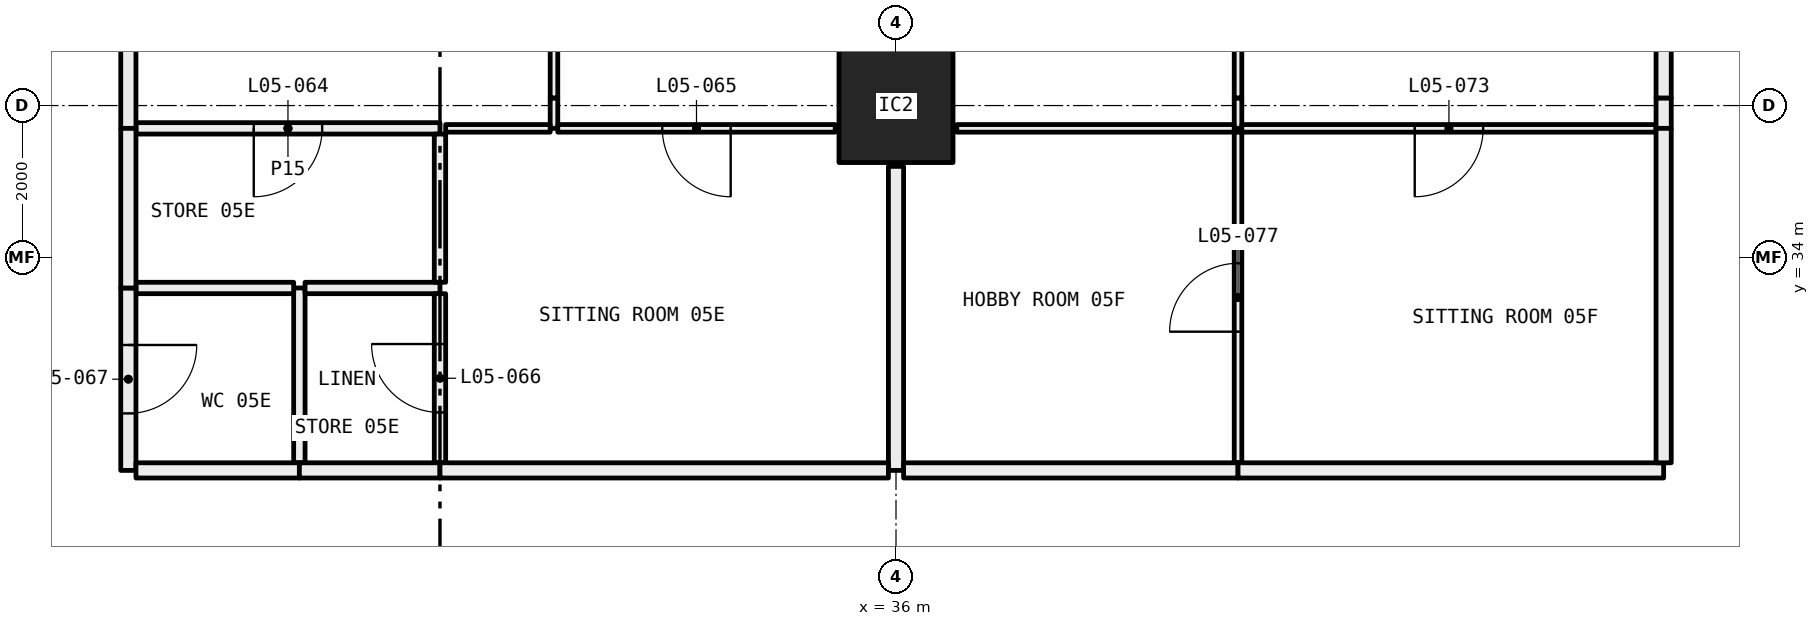
"""IFC4 building model, lengths in metres.
Left out: names, types, materials, properties, quantities, classifications, styles, units other than length and angle.
Written with IfcOpenShell. Run it as: python <this file> out.ifc"""

import sys

from ifc_helpers import new_model, si_unit, direction, frame, frame_2d, origin, origin_2d, place, context, subcontext, project, spatial, rectangle, hollow_rectangle, extrude, element, fill, save


model = new_model("IFC4")
c1 = context("Model", 3, precision=1e-05, world=origin(), true_north=direction((0.0, 1.0)))
c2 = subcontext(c1, "Body", "Model", "MODEL_VIEW")
j1 = project(units=[si_unit("LENGTHUNIT", "METRE"), si_unit("PLANEANGLEUNIT", "RADIAN")], contexts=[c1])
p1 = place(None, origin())
s1 = spatial("IfcSite", under=j1, at=p1, CompositionType="ELEMENT")
p2 = place(p1, origin())
s2 = spatial("IfcBuilding", under=s1, at=p2, CompositionType="ELEMENT")
p3 = place(p2, frame((0.0, 0.0, 30.0)))
s3 = spatial("IfcBuildingStorey", under=s2, at=p3, CompositionType="ELEMENT", Elevation=30.0)
p4 = place(p3, frame((36.0, 36.0, 0.0), z_axis=(0.0, 0.0, 1.0), x_axis=(1.0, 0.0, 0.0)))
e1 = element("IfcColumn", 1, at=p4, inside=s3, PredefinedType="COLUMN", context=c2, shape_type="SweptSolid", body=[
    extrude(hollow_rectangle(XDim=1.5, YDim=1.5, WallThickness=0.065, at=origin_2d()), origin(), (0.0, 0.0, 1.0), 3.05),
])
p5 = place(p3, frame((31.5, 35.7, 0.0), z_axis=(0.0, 0.0, 1.0), x_axis=(0.0, 1.0, 0.0)))
e2 = element("IfcWall", 2, at=p5, inside=s3, PredefinedType="PARTITIONING", context=c2, shape_type="SweptSolid", body=[
    extrude(rectangle(XDim=0.4, YDim=0.1, at=frame_2d((0.2, 0.0))), origin(), (0.0, 0.0, 1.0), 2.45),
])
p6 = place(p3, frame((31.5, 36.1, 0.0), z_axis=(0.0, 0.0, 1.0), x_axis=(0.0, 1.0, 0.0)))
e3 = element("IfcWall", 3, at=p6, inside=s3, PredefinedType="PARTITIONING", context=c2, shape_type="SweptSolid", body=[
    extrude(rectangle(XDim=5.825, YDim=0.1, at=frame_2d((2.913, 0.0))), origin(), (0.0, 0.0, 1.0), 3.05),
])
p7 = place(p6, frame((2.462, 0.0, 0.0)))
e4 = element("IfcOpeningElement", 4, at=p7, cuts=e3, PredefinedType="OPENING", context=c2, shape_type="SweptSolid", body=[
    extrude(rectangle(XDim=0.9, YDim=2.1, at=frame_2d((0.45, 1.05))), frame((0.0, 0.06, 0.0), z_axis=(0.0, -1.0, 0.0), x_axis=(1.0, 0.0, 0.0)), (0.0, 0.0, 1.0), 0.12),
])
p8 = place(p3, frame((26.0, 35.7, 0.0), z_axis=(0.0, 0.0, 1.0), x_axis=(1.0, 0.0, 0.0)))
e5 = element("IfcWall", 5, at=p8, inside=s3, PredefinedType="PARTITIONING", context=c2, shape_type="SweptSolid", body=[
    extrude(rectangle(XDim=4.0, YDim=0.15, at=frame_2d((2.0, 0.0))), origin(), (0.0, 0.0, 1.0), 3.05),
])
p9 = place(p8, frame((1.55, 0.0, 0.0)))
e6 = element("IfcOpeningElement", 6, at=p9, cuts=e5, PredefinedType="OPENING", context=c2, shape_type="SweptSolid", body=[
    extrude(rectangle(XDim=0.9, YDim=2.1, at=frame_2d((0.45, 1.05))), frame((0.0, 0.085, 0.0), z_axis=(0.0, -1.0, 0.0), x_axis=(1.0, 0.0, 0.0)), (0.0, 0.0, 1.0), 0.17),
])
p10 = place(p3, frame((30.075, 35.7, 0.0), z_axis=(0.0, 0.0, 1.0), x_axis=(1.0, 0.0, 0.0)))
e7 = element("IfcWall", 7, at=p10, inside=s3, PredefinedType="PARTITIONING", context=c2, shape_type="SweptSolid", body=[
    extrude(rectangle(XDim=1.375, YDim=0.1, at=frame_2d((0.688, 0.0))), origin(), (0.0, 0.0, 1.0), 3.05),
])
p11 = place(p3, frame((25.9, 41.9, 0.0), z_axis=(0.0, 0.0, 1.0), x_axis=(0.0, -1.0, 0.0)))
e8 = element("IfcWall", 8, at=p11, inside=s3, PredefinedType="PARTITIONING", context=c2, shape_type="SweptSolid", body=[
    extrude(rectangle(XDim=6.2, YDim=0.2, at=frame_2d((3.1, 0.0))), origin(), (0.0, 0.0, 1.0), 2.45),
])
p12 = place(p3, frame((31.55, 35.7, 0.0), z_axis=(0.0, 0.0, 1.0), x_axis=(1.0, 0.0, 0.0)))
e9 = element("IfcWall", 9, at=p12, inside=s3, PredefinedType="PARTITIONING", context=c2, shape_type="SweptSolid", body=[
    extrude(rectangle(XDim=3.65, YDim=0.1, at=frame_2d((1.825, 0.0))), origin(), (0.0, 0.0, 1.0), 3.05),
])
p13 = place(p12, frame((1.375, 0.0, 0.0)))
e10 = element("IfcOpeningElement", 10, at=p13, cuts=e9, PredefinedType="OPENING", context=c2, shape_type="SweptSolid", body=[
    extrude(rectangle(XDim=0.9, YDim=2.1, at=frame_2d((0.45, 1.05))), frame((0.0, 0.06, 0.0), z_axis=(0.0, -1.0, 0.0), x_axis=(1.0, 0.0, 0.0)), (0.0, 0.0, 1.0), 0.12),
])
p14 = place(p3, frame((28.15, 31.3, 0.0), z_axis=(0.0, 0.0, 1.0), x_axis=(0.0, 1.0, 0.0)))
e11 = element("IfcWall", 11, at=p14, inside=s3, PredefinedType="PARTITIONING", context=c2, shape_type="SweptSolid", body=[
    extrude(rectangle(XDim=2.3, YDim=0.15, at=frame_2d((1.15, 0.0))), origin(), (0.0, 0.0, 1.0), 3.05),
])
p15 = place(p3, frame((28.075, 33.6, 0.0), z_axis=(0.0, 0.0, 1.0), x_axis=(-1.0, 0.0, 0.0)))
e12 = element("IfcWall", 12, at=p15, inside=s3, PredefinedType="PARTITIONING", context=c2, shape_type="SweptSolid", body=[
    extrude(rectangle(XDim=2.075, YDim=0.15, at=frame_2d((1.038, 0.0))), origin(), (0.0, 0.0, 1.0), 3.05),
])
p16 = place(p3, frame((25.9, 33.6, 0.0), z_axis=(0.0, 0.0, 1.0), x_axis=(0.0, -1.0, 0.0)))
e13 = element("IfcWall", 13, at=p16, inside=s3, PredefinedType="PARTITIONING", context=c2, shape_type="SweptSolid", body=[
    extrude(rectangle(XDim=2.4, YDim=0.2, at=frame_2d((1.2, 0.0))), origin(), (0.0, 0.0, 1.0), 3.05),
])
p17 = place(p16, frame((0.75, 0.0, 0.0)))
e14 = element("IfcOpeningElement", 14, at=p17, cuts=e13, PredefinedType="OPENING", context=c2, shape_type="SweptSolid", body=[
    extrude(rectangle(XDim=0.9, YDim=2.1, at=frame_2d((0.45, 1.05))), frame((0.0, 0.11, 0.0), z_axis=(0.0, -1.0, 0.0), x_axis=(1.0, 0.0, 0.0)), (0.0, 0.0, 1.0), 0.22),
])
p18 = place(p3, frame((26.0, 31.2, 0.0), z_axis=(0.0, 0.0, 1.0), x_axis=(1.0, 0.0, 0.0)))
e15 = element("IfcWall", 15, at=p18, inside=s3, PredefinedType="PARTITIONING", context=c2, shape_type="SweptSolid", body=[
    extrude(rectangle(XDim=2.15, YDim=0.2, at=frame_2d((1.075, 0.0))), origin(), (0.0, 0.0, 1.0), 3.05),
])
p19 = place(p3, frame((30.0, 33.6, 0.0), z_axis=(0.0, 0.0, 1.0), x_axis=(-1.0, 0.0, 0.0)))
e16 = element("IfcWall", 16, at=p19, inside=s3, PredefinedType="PARTITIONING", context=c2, shape_type="SweptSolid", body=[
    extrude(rectangle(XDim=1.775, YDim=0.15, at=frame_2d((0.887, 0.0))), origin(), (0.0, 0.0, 1.0), 3.05),
])
p20 = place(p3, frame((30.0, 31.3, 0.0), z_axis=(0.0, 0.0, 1.0), x_axis=(0.0, 1.0, 0.0)))
e17 = element("IfcWall", 17, at=p20, inside=s3, PredefinedType="PARTITIONING", context=c2, shape_type="SweptSolid", body=[
    extrude(rectangle(XDim=2.225, YDim=0.15, at=frame_2d((1.112, 0.0))), origin(), (0.0, 0.0, 1.0), 3.05),
])
p21 = place(p20, frame((0.663, 0.0, 0.0)))
e18 = element("IfcOpeningElement", 18, at=p21, cuts=e17, PredefinedType="OPENING", context=c2, shape_type="SweptSolid", body=[
    extrude(rectangle(XDim=0.9, YDim=2.1, at=frame_2d((0.45, 1.05))), frame((0.0, 0.085, 0.0), z_axis=(0.0, -1.0, 0.0), x_axis=(1.0, 0.0, 0.0)), (0.0, 0.0, 1.0), 0.17),
])
p22 = place(p3, frame((28.15, 31.2, 0.0), z_axis=(0.0, 0.0, 1.0), x_axis=(1.0, 0.0, 0.0)))
e19 = element("IfcWall", 19, at=p22, inside=s3, PredefinedType="PARTITIONING", context=c2, shape_type="SweptSolid", body=[
    extrude(rectangle(XDim=1.85, YDim=0.2, at=frame_2d((0.925, 0.0))), origin(), (0.0, 0.0, 1.0), 3.05),
])
p23 = place(p3, frame((30.0, 33.675, 0.0), z_axis=(0.0, 0.0, 1.0), x_axis=(0.0, 1.0, 0.0)))
e20 = element("IfcWall", 20, at=p23, inside=s3, PredefinedType="PARTITIONING", context=c2, shape_type="SweptSolid", body=[
    extrude(rectangle(XDim=1.95, YDim=0.15, at=frame_2d((0.975, 0.0))), origin(), (0.0, 0.0, 1.0), 3.05),
])
p24 = place(p3, frame((25.9, 35.7, 0.0), z_axis=(0.0, 0.0, 1.0), x_axis=(0.0, -1.0, 0.0)))
e21 = element("IfcWall", 21, at=p24, inside=s3, PredefinedType="PARTITIONING", context=c2, shape_type="SweptSolid", body=[
    extrude(rectangle(XDim=2.1, YDim=0.2, at=frame_2d((1.05, 0.0))), origin(), (0.0, 0.0, 1.0), 3.05),
])
p25 = place(p3, frame((36.0, 31.2, 0.0), z_axis=(0.0, 0.0, 1.0), x_axis=(0.0, 1.0, 0.0)))
e22 = element("IfcWall", 22, at=p25, inside=s3, PredefinedType="PARTITIONING", context=c2, shape_type="SweptSolid", body=[
    extrude(rectangle(XDim=4.0, YDim=0.2, at=frame_2d((2.0, 0.0))), origin(), (0.0, 0.0, 1.0), 2.45),
])
p26 = place(p3, frame((30.0, 31.2, 0.0), z_axis=(0.0, 0.0, 1.0), x_axis=(1.0, 0.0, 0.0)))
e23 = element("IfcWall", 23, at=p26, inside=s3, PredefinedType="PARTITIONING", context=c2, shape_type="SweptSolid", body=[
    extrude(rectangle(XDim=5.9, YDim=0.2, at=frame_2d((2.95, 0.0))), origin(), (0.0, 0.0, 1.0), 3.05),
])
p27 = place(p3, frame((40.5, 35.7, 0.0), z_axis=(0.0, 0.0, 1.0), x_axis=(0.0, 1.0, 0.0)))
e24 = element("IfcWall", 24, at=p27, inside=s3, PredefinedType="PARTITIONING", context=c2, shape_type="SweptSolid", body=[
    extrude(rectangle(XDim=0.4, YDim=0.1, at=frame_2d((0.2, 0.0))), origin(), (0.0, 0.0, 1.0), 2.45),
])
p28 = place(p3, frame((40.5, 36.1, 0.0), z_axis=(0.0, 0.0, 1.0), x_axis=(0.0, 1.0, 0.0)))
e25 = element("IfcWall", 25, at=p28, inside=s3, PredefinedType="PARTITIONING", context=c2, shape_type="SweptSolid", body=[
    extrude(rectangle(XDim=5.825, YDim=0.1, at=frame_2d((2.913, 0.0))), origin(), (0.0, 0.0, 1.0), 3.05),
])
p29 = place(p28, frame((2.462, 0.0, 0.0)))
e26 = element("IfcOpeningElement", 26, at=p29, cuts=e25, PredefinedType="OPENING", context=c2, shape_type="SweptSolid", body=[
    extrude(rectangle(XDim=0.9, YDim=2.1, at=frame_2d((0.45, 1.05))), frame((0.0, 0.06, 0.0), z_axis=(0.0, -1.0, 0.0), x_axis=(1.0, 0.0, 0.0)), (0.0, 0.0, 1.0), 0.12),
])
p30 = place(p3, frame((36.8, 35.7, 0.0), z_axis=(0.0, 0.0, 1.0), x_axis=(1.0, 0.0, 0.0)))
e27 = element("IfcWall", 27, at=p30, inside=s3, PredefinedType="PARTITIONING", context=c2, shape_type="SweptSolid", body=[
    extrude(rectangle(XDim=3.65, YDim=0.1, at=frame_2d((1.825, 0.0))), origin(), (0.0, 0.0, 1.0), 3.05),
])
p31 = place(p3, frame((40.55, 35.7, 0.0), z_axis=(0.0, 0.0, 1.0), x_axis=(1.0, 0.0, 0.0)))
e28 = element("IfcWall", 28, at=p31, inside=s3, PredefinedType="PARTITIONING", context=c2, shape_type="SweptSolid", body=[
    extrude(rectangle(XDim=5.45, YDim=0.1, at=frame_2d((2.725, 0.0))), origin(), (0.0, 0.0, 1.0), 3.05),
])
p32 = place(p31, frame((2.275, 0.0, 0.0)))
e29 = element("IfcOpeningElement", 29, at=p32, cuts=e28, PredefinedType="OPENING", context=c2, shape_type="SweptSolid", body=[
    extrude(rectangle(XDim=0.9, YDim=2.1, at=frame_2d((0.45, 1.05))), frame((0.0, 0.06, 0.0), z_axis=(0.0, -1.0, 0.0), x_axis=(1.0, 0.0, 0.0)), (0.0, 0.0, 1.0), 0.12),
])
p33 = place(p3, frame((46.1, 35.7, 0.0), z_axis=(0.0, 0.0, 1.0), x_axis=(0.0, 1.0, 0.0)))
e30 = element("IfcWall", 30, at=p33, inside=s3, PredefinedType="PARTITIONING", context=c2, shape_type="SweptSolid", body=[
    extrude(rectangle(XDim=0.4, YDim=0.2, at=frame_2d((0.2, 0.0))), origin(), (0.0, 0.0, 1.0), 2.45),
])
p34 = place(p3, frame((46.1, 36.1, 0.0), z_axis=(0.0, 0.0, 1.0), x_axis=(0.0, 1.0, 0.0)))
e31 = element("IfcWall", 31, at=p34, inside=s3, PredefinedType="PARTITIONING", context=c2, shape_type="SweptSolid", body=[
    extrude(rectangle(XDim=5.8, YDim=0.2, at=frame_2d((2.9, 0.0))), origin(), (0.0, 0.0, 1.0), 3.05),
])
p35 = place(p3, frame((40.5, 31.3, 0.0), z_axis=(0.0, 0.0, 1.0), x_axis=(0.0, 1.0, 0.0)))
e32 = element("IfcWall", 32, at=p35, inside=s3, PredefinedType="PARTITIONING", context=c2, shape_type="SweptSolid", body=[
    extrude(rectangle(XDim=4.35, YDim=0.1, at=frame_2d((2.175, 0.0))), origin(), (0.0, 0.0, 1.0), 3.05),
])
p36 = place(p35, frame((1.725, 0.0, 0.0)))
e33 = element("IfcOpeningElement", 33, at=p36, cuts=e32, PredefinedType="OPENING", context=c2, shape_type="SweptSolid", body=[
    extrude(rectangle(XDim=0.9, YDim=2.1, at=frame_2d((0.45, 1.05))), frame((0.0, 0.06, 0.0), z_axis=(0.0, -1.0, 0.0), x_axis=(1.0, 0.0, 0.0)), (0.0, 0.0, 1.0), 0.12),
])
p37 = place(p3, frame((36.1, 31.2, 0.0), z_axis=(0.0, 0.0, 1.0), x_axis=(1.0, 0.0, 0.0)))
e34 = element("IfcWall", 34, at=p37, inside=s3, PredefinedType="PARTITIONING", context=c2, shape_type="SweptSolid", body=[
    extrude(rectangle(XDim=4.4, YDim=0.2, at=frame_2d((2.2, 0.0))), origin(), (0.0, 0.0, 1.0), 3.05),
])
p38 = place(p3, frame((40.5, 31.2, 0.0), z_axis=(0.0, 0.0, 1.0), x_axis=(1.0, 0.0, 0.0)))
e35 = element("IfcWall", 35, at=p38, inside=s3, PredefinedType="PARTITIONING", context=c2, shape_type="SweptSolid", body=[
    extrude(rectangle(XDim=5.6, YDim=0.2, at=frame_2d((2.8, 0.0))), origin(), (0.0, 0.0, 1.0), 3.05),
])
p39 = place(p3, frame((46.1, 31.3, 0.0), z_axis=(0.0, 0.0, 1.0), x_axis=(0.0, 1.0, 0.0)))
e36 = element("IfcWall", 36, at=p39, inside=s3, PredefinedType="PARTITIONING", context=c2, shape_type="SweptSolid", body=[
    extrude(rectangle(XDim=4.4, YDim=0.2, at=frame_2d((2.2, 0.0))), origin(), (0.0, 0.0, 1.0), 3.05),
])
p40 = place(p9, frame((0.9, 0.0, 0.0), x_axis=(-1.0, 0.0, 0.0)))
e37 = element("IfcDoor", 37, at=p40, inside=s3, OperationType="SINGLE_SWING_LEFT", PredefinedType="DOOR", context=c2, shape_type="SweptSolid", body=[
    extrude(rectangle(XDim=0.9, YDim=2.1, at=frame_2d((0.45, 1.05))), frame((0.0, 0.025, 0.0), z_axis=(0.0, -1.0, 0.0), x_axis=(1.0, 0.0, 0.0)), (0.0, 0.0, 1.0), 0.05),
])
fill(e6, e37)
p41 = place(p13, frame((0.9, 0.0, 0.0), x_axis=(-1.0, 0.0, 0.0)))
e38 = element("IfcDoor", 38, at=p41, inside=s3, OperationType="SINGLE_SWING_RIGHT", PredefinedType="DOOR", context=c2, shape_type="SweptSolid", body=[
    extrude(rectangle(XDim=0.9, YDim=2.1, at=frame_2d((0.45, 1.05))), frame((0.0, 0.025, 0.0), z_axis=(0.0, -1.0, 0.0), x_axis=(1.0, 0.0, 0.0)), (0.0, 0.0, 1.0), 0.05),
])
fill(e10, e38)
p42 = place(p21, origin())
e39 = element("IfcDoor", 39, at=p42, inside=s3, OperationType="SINGLE_SWING_LEFT", PredefinedType="DOOR", context=c2, shape_type="SweptSolid", body=[
    extrude(rectangle(XDim=0.9, YDim=2.1, at=frame_2d((0.45, 1.05))), frame((0.0, 0.025, 0.0), z_axis=(0.0, -1.0, 0.0), x_axis=(1.0, 0.0, 0.0)), (0.0, 0.0, 1.0), 0.05),
])
fill(e18, e39)
p43 = place(p17, origin())
e40 = element("IfcDoor", 40, at=p43, inside=s3, OperationType="SINGLE_SWING_RIGHT", PredefinedType="DOOR", context=c2, shape_type="SweptSolid", body=[
    extrude(rectangle(XDim=0.9, YDim=2.1, at=frame_2d((0.45, 1.05))), frame((0.0, 0.025, 0.0), z_axis=(0.0, -1.0, 0.0), x_axis=(1.0, 0.0, 0.0)), (0.0, 0.0, 1.0), 0.05),
])
fill(e14, e40)
p44 = place(p32, frame((0.9, 0.0, 0.0), x_axis=(-1.0, 0.0, 0.0)))
e41 = element("IfcDoor", 41, at=p44, inside=s3, OperationType="SINGLE_SWING_LEFT", PredefinedType="DOOR", context=c2, shape_type="SweptSolid", body=[
    extrude(rectangle(XDim=0.9, YDim=2.1, at=frame_2d((0.45, 1.05))), frame((0.0, 0.025, 0.0), z_axis=(0.0, -1.0, 0.0), x_axis=(1.0, 0.0, 0.0)), (0.0, 0.0, 1.0), 0.05),
])
fill(e29, e41)
p45 = place(p36, origin())
e42 = element("IfcDoor", 42, at=p45, inside=s3, OperationType="SINGLE_SWING_RIGHT", PredefinedType="DOOR", context=c2, shape_type="SweptSolid", body=[
    extrude(rectangle(XDim=0.9, YDim=2.1, at=frame_2d((0.45, 1.05))), frame((0.0, 0.025, 0.0), z_axis=(0.0, -1.0, 0.0), x_axis=(1.0, 0.0, 0.0)), (0.0, 0.0, 1.0), 0.05),
])
fill(e33, e42)
save(model, sys.argv[1])
